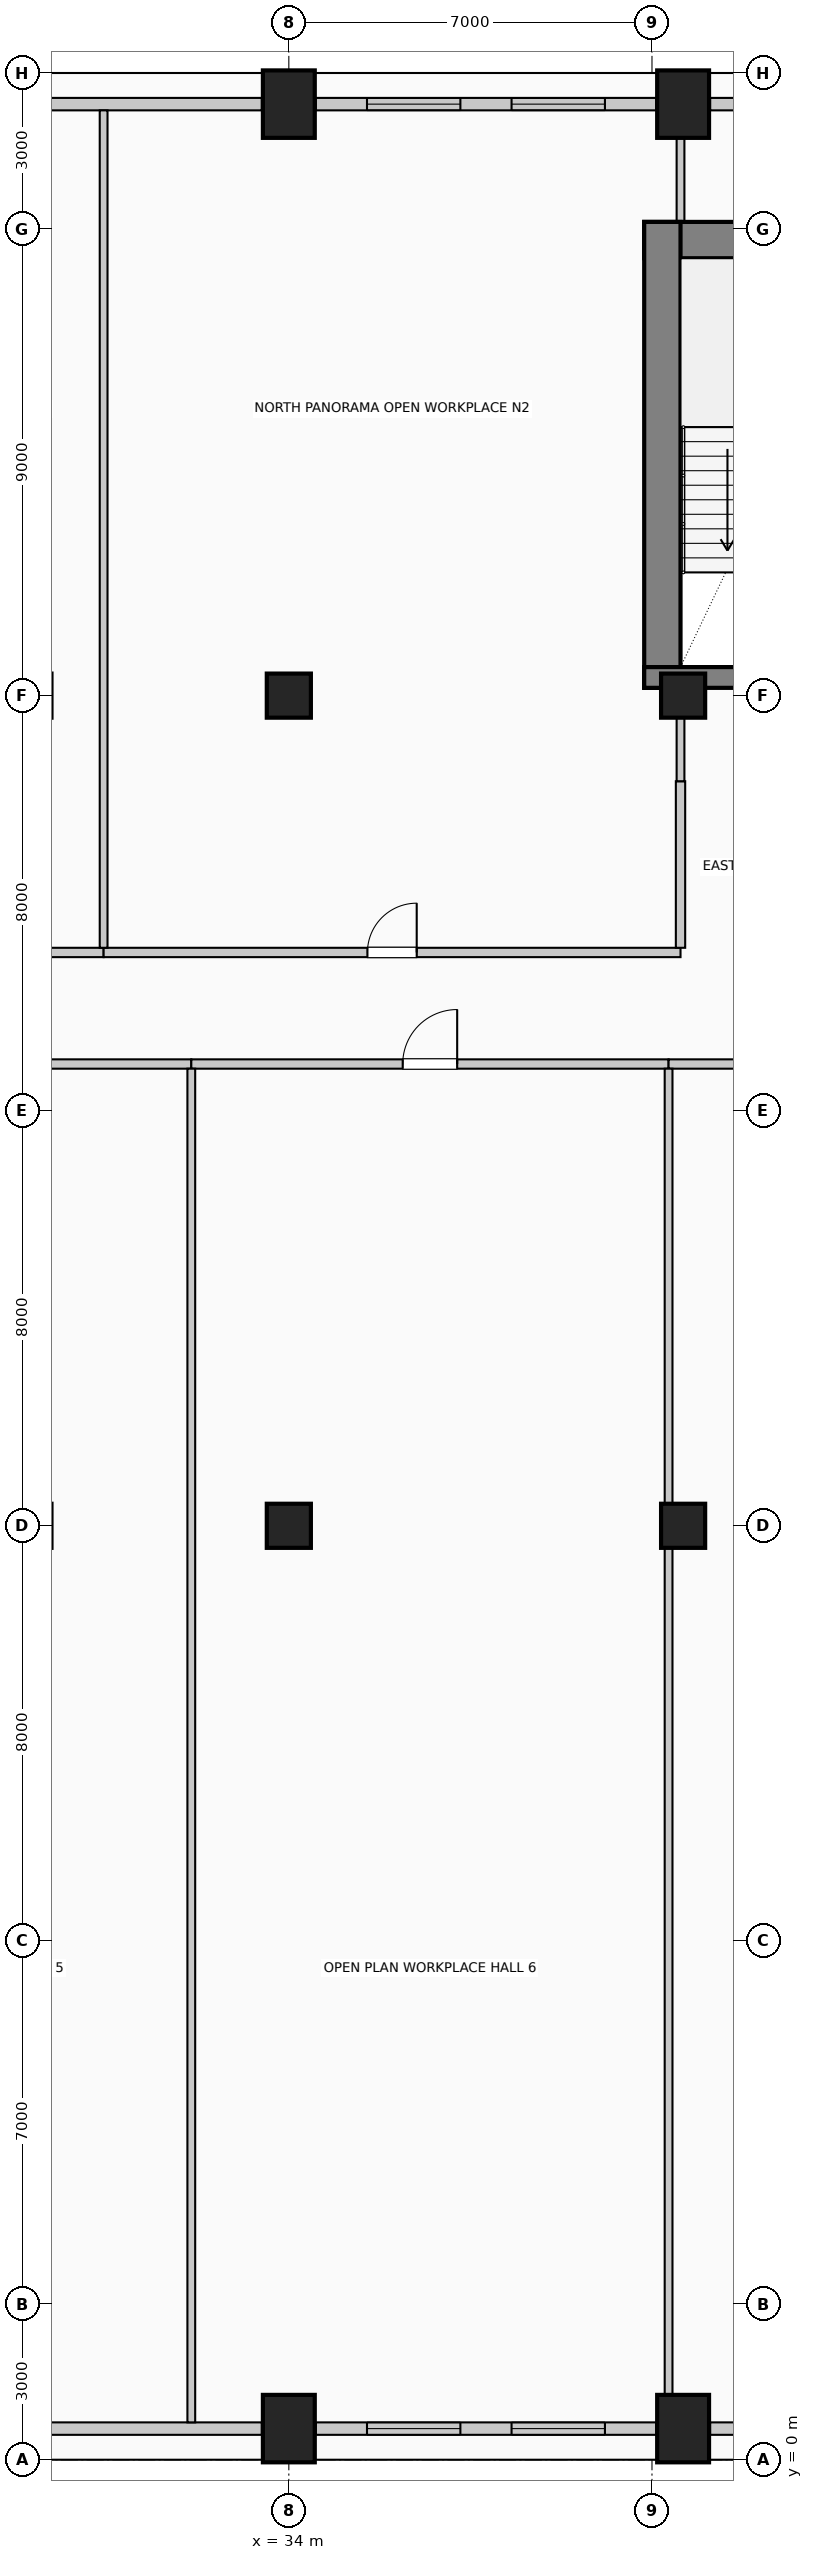
"""IFC4 building model, lengths in metres.
Left out: names, types, materials, properties, quantities, classifications, styles, units other than length and angle.
Written with IfcOpenShell. Run it as: python <this file> out.ifc"""

import sys

from ifc_helpers import new_model, si_unit, direction, frame, frame_2d, origin, origin_2d, place, context, subcontext, project, spatial, rectangle, circle, extrude, element, fill, save


model = new_model("IFC4")
c1 = context("Model", 3, precision=1e-05, world=origin(), true_north=direction((0.0, 1.0)))
c2 = subcontext(c1, "Body", "Model", "MODEL_VIEW")
j1 = project(units=[si_unit("LENGTHUNIT", "METRE"), si_unit("PLANEANGLEUNIT", "RADIAN")], contexts=[c1])
p1 = place(None, origin())
s1 = spatial("IfcSite", under=j1, at=p1, CompositionType="ELEMENT")
p2 = place(p1, origin())
s2 = spatial("IfcBuilding", under=s1, at=p2, CompositionType="ELEMENT")
p3 = place(p2, frame((0.0, 0.0, 248.6)))
s3 = spatial("IfcBuildingStorey", under=s2, at=p3, CompositionType="ELEMENT", Elevation=248.6)
p4 = place(p3, frame((40.85, 42.78, 0.0), z_axis=(0.0, 0.0, 1.0), x_axis=(1.0, 0.0, 0.0)))
e1 = element("IfcWall", 1, at=p4, inside=s3, PredefinedType="SHEAR", context=c2, shape_type="SweptSolid", body=[
    extrude(rectangle(XDim=14.3, YDim=0.7, at=frame_2d((7.15, 0.0))), origin(), (0.0, 0.0, 1.0), 4.0),
])
p5 = place(p3, frame((41.2, 34.15, 0.0), z_axis=(0.0, 0.0, 1.0), x_axis=(0.0, 1.0, 0.0)))
e2 = element("IfcWall", 2, at=p5, inside=s3, PredefinedType="SHEAR", context=c2, shape_type="SweptSolid", body=[
    extrude(rectangle(XDim=8.98, YDim=0.7, at=frame_2d((4.49, 0.0))), origin(), (0.0, 0.0, 1.0), 4.0),
])
p6 = place(p3, frame((40.85, 34.35, 0.0), z_axis=(0.0, 0.0, 1.0), x_axis=(1.0, 0.0, 0.0)))
e3 = element("IfcWall", 3, at=p6, inside=s3, PredefinedType="SHEAR", context=c2, shape_type="SweptSolid", body=[
    extrude(rectangle(XDim=4.86, YDim=0.4, at=frame_2d((2.43, 0.0))), origin(), (0.0, 0.0, 1.0), 4.0),
])
p7 = place(p6, frame((2.4, 0.0, 0.0)))
e4 = element("IfcOpeningElement", 4, at=p7, cuts=e3, PredefinedType="OPENING", context=c2, shape_type="SweptSolid", body=[
    extrude(rectangle(XDim=1.15, YDim=2.2, at=frame_2d((0.575, 1.1))), frame((0.0, 0.21, 0.0), z_axis=(0.0, -1.0, 0.0), x_axis=(1.0, 0.0, 0.0)), (0.0, 0.0, 1.0), 0.42),
])
for number, where, z_axis, x_axis in (
    (5, (34.0, 0.6, 0.0), (0.0, 0.0, 1.0), (1.0, 0.0, 0.0)),
    (6, (34.0, 45.4, 0.0), (0.0, 0.0, 1.0), (1.0, 0.0, 0.0)),
    (7, (41.6, 0.6, 0.0), (0.0, 0.0, 1.0), (1.0, 0.0, 0.0)),
    (8, (41.6, 45.4, 0.0), (0.0, 0.0, 1.0), (1.0, 0.0, 0.0)),
):
    element("IfcColumn", number, at=place(p3, frame(where, z_axis=z_axis, x_axis=x_axis)), inside=s3, PredefinedType="COLUMN", context=c2, shape_type="SweptSolid", body=[
        extrude(rectangle(XDim=1.0, YDim=1.3, at=origin_2d()), origin(), (0.0, 0.0, 1.0), 4.0),
    ])
for number, where, z_axis, x_axis in (
    (9, (41.6, 18.0, 0.0), (0.0, 0.0, 1.0), (1.0, 0.0, 0.0)),
    (10, (41.6, 34.0, 0.0), (0.0, 0.0, 1.0), (1.0, 0.0, 0.0)),
    (11, (34.0, 18.0, 0.0), (0.0, 0.0, 1.0), (1.0, 0.0, 0.0)),
    (12, (34.0, 34.0, 0.0), (0.0, 0.0, 1.0), (1.0, 0.0, 0.0)),
):
    element("IfcColumn", number, at=place(p3, frame(where, z_axis=z_axis, x_axis=x_axis)), inside=s3, PredefinedType="COLUMN", context=c2, shape_type="SweptSolid", body=[
        extrude(circle(Radius=0.425, at=origin_2d()), origin(), (0.0, 0.0, 1.0), 4.0),
    ])
p8 = place(p3, frame((33.48, 0.6, 0.0), z_axis=(0.0, 0.0, 1.0), x_axis=(-1.0, 0.0, 0.0)))
e13 = element("IfcWall", 13, at=p8, inside=s3, PredefinedType="SOLIDWALL", context=c2, shape_type="SweptSolid", body=[
    extrude(rectangle(XDim=4.085, YDim=0.24, at=frame_2d((2.042, 0.0))), origin(), (0.0, 0.0, 1.0), 3.0),
])
p9 = place(p3, frame((41.08, 0.6, 0.0), z_axis=(0.0, 0.0, 1.0), x_axis=(-1.0, 0.0, 0.0)))
e14 = element("IfcWall", 14, at=p9, inside=s3, PredefinedType="SOLIDWALL", context=c2, shape_type="SweptSolid", body=[
    extrude(rectangle(XDim=6.56, YDim=0.24, at=frame_2d((3.28, 0.0))), origin(), (0.0, 0.0, 1.0), 3.0),
])
p10 = place(p9, frame((0.987, 0.0, 0.42)))
e15 = element("IfcOpeningElement", 15, at=p10, cuts=e14, PredefinedType="OPENING", context=c2, shape_type="SweptSolid", body=[
    extrude(rectangle(XDim=1.8, YDim=2.2, at=frame_2d((0.9, 1.1))), frame((0.0, 0.13, 0.0), z_axis=(0.0, -1.0, 0.0), x_axis=(1.0, 0.0, 0.0)), (0.0, 0.0, 1.0), 0.26),
])
p11 = place(p9, frame((3.773, 0.0, 0.42)))
e16 = element("IfcOpeningElement", 16, at=p11, cuts=e14, PredefinedType="OPENING", context=c2, shape_type="SweptSolid", body=[
    extrude(rectangle(XDim=1.8, YDim=2.2, at=frame_2d((0.9, 1.1))), frame((0.0, 0.13, 0.0), z_axis=(0.0, -1.0, 0.0), x_axis=(1.0, 0.0, 0.0)), (0.0, 0.0, 1.0), 0.26),
])
p12 = place(p3, frame((43.605, 0.6, 0.0), z_axis=(0.0, 0.0, 1.0), x_axis=(-1.0, 0.0, 0.0)))
e17 = element("IfcWall", 17, at=p12, inside=s3, PredefinedType="SOLIDWALL", context=c2, shape_type="SweptSolid", body=[
    extrude(rectangle(XDim=1.485, YDim=0.24, at=frame_2d((0.742, 0.0))), origin(), (0.0, 0.0, 1.0), 3.0),
])
p13 = place(p3, frame((29.395, 45.4, 0.0), z_axis=(0.0, 0.0, 1.0), x_axis=(1.0, 0.0, 0.0)))
e18 = element("IfcWall", 18, at=p13, inside=s3, PredefinedType="SOLIDWALL", context=c2, shape_type="SweptSolid", body=[
    extrude(rectangle(XDim=4.085, YDim=0.24, at=frame_2d((2.042, 0.0))), origin(), (0.0, 0.0, 1.0), 3.0),
])
p14 = place(p3, frame((34.52, 45.4, 0.0), z_axis=(0.0, 0.0, 1.0), x_axis=(1.0, 0.0, 0.0)))
e19 = element("IfcWall", 19, at=p14, inside=s3, PredefinedType="SOLIDWALL", context=c2, shape_type="SweptSolid", body=[
    extrude(rectangle(XDim=6.56, YDim=0.24, at=frame_2d((3.28, 0.0))), origin(), (0.0, 0.0, 1.0), 3.0),
])
p15 = place(p14, frame((0.987, 0.0, 0.42)))
e20 = element("IfcOpeningElement", 20, at=p15, cuts=e19, PredefinedType="OPENING", context=c2, shape_type="SweptSolid", body=[
    extrude(rectangle(XDim=1.8, YDim=2.2, at=frame_2d((0.9, 1.1))), frame((0.0, 0.13, 0.0), z_axis=(0.0, -1.0, 0.0), x_axis=(1.0, 0.0, 0.0)), (0.0, 0.0, 1.0), 0.26),
])
p16 = place(p14, frame((3.773, 0.0, 0.42)))
e21 = element("IfcOpeningElement", 21, at=p16, cuts=e19, PredefinedType="OPENING", context=c2, shape_type="SweptSolid", body=[
    extrude(rectangle(XDim=1.8, YDim=2.2, at=frame_2d((0.9, 1.1))), frame((0.0, 0.13, 0.0), z_axis=(0.0, -1.0, 0.0), x_axis=(1.0, 0.0, 0.0)), (0.0, 0.0, 1.0), 0.26),
])
p17 = place(p3, frame((42.12, 45.4, 0.0), z_axis=(0.0, 0.0, 1.0), x_axis=(1.0, 0.0, 0.0)))
e22 = element("IfcWall", 22, at=p17, inside=s3, PredefinedType="SOLIDWALL", context=c2, shape_type="SweptSolid", body=[
    extrude(rectangle(XDim=1.485, YDim=0.24, at=frame_2d((0.742, 0.0))), origin(), (0.0, 0.0, 1.0), 3.0),
])
p18 = place(p3, frame((23.1, 26.9, 0.0), z_axis=(0.0, 0.0, 1.0), x_axis=(1.0, 0.0, 0.0)))
e23 = element("IfcWall", 23, at=p18, inside=s3, PredefinedType="PARTITIONING", context=c2, shape_type="SweptSolid", body=[
    extrude(rectangle(XDim=9.02, YDim=0.18, at=frame_2d((4.51, 0.0))), origin(), (0.0, 0.0, 1.0), 3.75),
])
p19 = place(p18, frame((4.035, 0.0, 0.0)))
e24 = element("IfcOpeningElement", 24, at=p19, cuts=e23, PredefinedType="OPENING", context=c2, shape_type="SweptSolid", body=[
    extrude(rectangle(XDim=0.95, YDim=2.15, at=frame_2d((0.475, 1.075))), frame((0.0, 0.1, 0.0), z_axis=(0.0, -1.0, 0.0), x_axis=(1.0, 0.0, 0.0)), (0.0, 0.0, 1.0), 0.2),
])
p20 = place(p3, frame((32.12, 26.9, 0.0), z_axis=(0.0, 0.0, 1.0), x_axis=(1.0, 0.0, 0.0)))
e25 = element("IfcWall", 25, at=p20, inside=s3, PredefinedType="PARTITIONING", context=c2, shape_type="SweptSolid", body=[
    extrude(rectangle(XDim=9.2, YDim=0.18, at=frame_2d((4.6, 0.0))), origin(), (0.0, 0.0, 1.0), 3.75),
])
p21 = place(p20, frame((4.075, 0.0, 0.0)))
e26 = element("IfcOpeningElement", 26, at=p21, cuts=e25, PredefinedType="OPENING", context=c2, shape_type="SweptSolid", body=[
    extrude(rectangle(XDim=1.05, YDim=2.15, at=frame_2d((0.525, 1.075))), frame((0.0, 0.1, 0.0), z_axis=(0.0, -1.0, 0.0), x_axis=(1.0, 0.0, 0.0)), (0.0, 0.0, 1.0), 0.2),
])
p22 = place(p3, frame((41.32, 26.9, 0.0), z_axis=(0.0, 0.0, 1.0), x_axis=(1.0, 0.0, 0.0)))
e27 = element("IfcWall", 27, at=p22, inside=s3, PredefinedType="PARTITIONING", context=c2, shape_type="SweptSolid", body=[
    extrude(rectangle(XDim=8.18, YDim=0.18, at=frame_2d((4.09, 0.0))), origin(), (0.0, 0.0, 1.0), 3.75),
])
p23 = place(p22, frame((3.615, 0.0, 0.0)))
e28 = element("IfcOpeningElement", 28, at=p23, cuts=e27, PredefinedType="OPENING", context=c2, shape_type="SweptSolid", body=[
    extrude(rectangle(XDim=0.95, YDim=2.15, at=frame_2d((0.475, 1.075))), frame((0.0, 0.1, 0.0), z_axis=(0.0, -1.0, 0.0), x_axis=(1.0, 0.0, 0.0)), (0.0, 0.0, 1.0), 0.2),
])
p24 = place(p3, frame((23.1, 29.05, 0.0), z_axis=(0.0, 0.0, 1.0), x_axis=(1.0, 0.0, 0.0)))
e29 = element("IfcWall", 29, at=p24, inside=s3, PredefinedType="PARTITIONING", context=c2, shape_type="SweptSolid", body=[
    extrude(rectangle(XDim=7.33, YDim=0.18, at=frame_2d((3.665, 0.0))), origin(), (0.0, 0.0, 1.0), 3.75),
])
p25 = place(p24, frame((3.14, 0.0, 0.0)))
e30 = element("IfcOpeningElement", 30, at=p25, cuts=e29, PredefinedType="OPENING", context=c2, shape_type="SweptSolid", body=[
    extrude(rectangle(XDim=1.05, YDim=2.15, at=frame_2d((0.525, 1.075))), frame((0.0, 0.1, 0.0), z_axis=(0.0, -1.0, 0.0), x_axis=(1.0, 0.0, 0.0)), (0.0, 0.0, 1.0), 0.2),
])
p26 = place(p3, frame((30.43, 29.05, 0.0), z_axis=(0.0, 0.0, 1.0), x_axis=(1.0, 0.0, 0.0)))
e31 = element("IfcWall", 31, at=p26, inside=s3, PredefinedType="PARTITIONING", context=c2, shape_type="SweptSolid", body=[
    extrude(rectangle(XDim=11.12, YDim=0.18, at=frame_2d((5.56, 0.0))), origin(), (0.0, 0.0, 1.0), 3.75),
])
p27 = place(p26, frame((5.085, 0.0, 0.0)))
e32 = element("IfcOpeningElement", 32, at=p27, cuts=e31, PredefinedType="OPENING", context=c2, shape_type="SweptSolid", body=[
    extrude(rectangle(XDim=0.95, YDim=2.15, at=frame_2d((0.475, 1.075))), frame((0.0, 0.1, 0.0), z_axis=(0.0, -1.0, 0.0), x_axis=(1.0, 0.0, 0.0)), (0.0, 0.0, 1.0), 0.2),
])
p28 = place(p3, frame((30.43, 29.14, 0.0), z_axis=(0.0, 0.0, 1.0), x_axis=(0.0, 1.0, 0.0)))
e33 = element("IfcWall", 33, at=p28, inside=s3, PredefinedType="PARTITIONING", context=c2, shape_type="SweptSolid", body=[
    extrude(rectangle(XDim=16.14, YDim=0.15, at=frame_2d((8.07, 0.0))), origin(), (0.0, 0.0, 1.0), 3.75),
])
p29 = place(p3, frame((32.12, 0.72, 0.0), z_axis=(0.0, 0.0, 1.0), x_axis=(0.0, 1.0, 0.0)))
e34 = element("IfcWall", 34, at=p29, inside=s3, PredefinedType="PARTITIONING", context=c2, shape_type="SweptSolid", body=[
    extrude(rectangle(XDim=26.09, YDim=0.15, at=frame_2d((13.045, 0.0))), origin(), (0.0, 0.0, 1.0), 3.75),
])
p30 = place(p3, frame((41.32, 1.25, 0.0), z_axis=(0.0, 0.0, 1.0), x_axis=(0.0, 1.0, 0.0)))
e35 = element("IfcWall", 35, at=p30, inside=s3, PredefinedType="PARTITIONING", context=c2, shape_type="SweptSolid", body=[
    extrude(rectangle(XDim=16.325, YDim=0.15, at=frame_2d((8.163, 0.0))), origin(), (0.0, 0.0, 1.0), 3.195),
])
p31 = place(p3, frame((41.32, 18.425, 0.0), z_axis=(0.0, 0.0, 1.0), x_axis=(0.0, 1.0, 0.0)))
e36 = element("IfcWall", 36, at=p31, inside=s3, PredefinedType="PARTITIONING", context=c2, shape_type="SweptSolid", body=[
    extrude(rectangle(XDim=8.385, YDim=0.15, at=frame_2d((4.192, 0.0))), origin(), (0.0, 0.0, 1.0), 3.195),
])
p32 = place(p3, frame((41.55, 29.14, 0.0), z_axis=(0.0, 0.0, 1.0), x_axis=(0.0, 1.0, 0.0)))
e37 = element("IfcWall", 37, at=p32, inside=s3, PredefinedType="PARTITIONING", context=c2, shape_type="SweptSolid", body=[
    extrude(rectangle(XDim=3.21, YDim=0.18, at=frame_2d((1.605, 0.0))), origin(), (0.0, 0.0, 1.0), 3.195),
])
p33 = place(p3, frame((41.55, 32.35, 0.0), z_axis=(0.0, 0.0, 1.0), x_axis=(0.0, 1.0, 0.0)))
e38 = element("IfcWall", 38, at=p33, inside=s3, PredefinedType="PARTITIONING", context=c2, shape_type="SweptSolid", body=[
    extrude(rectangle(XDim=1.225, YDim=0.15, at=frame_2d((0.612, 0.0))), origin(), (0.0, 0.0, 1.0), 3.195),
])
p34 = place(p3, frame((41.55, 43.13, 0.0), z_axis=(0.0, 0.0, 1.0), x_axis=(0.0, 1.0, 0.0)))
e39 = element("IfcWall", 39, at=p34, inside=s3, PredefinedType="PARTITIONING", context=c2, shape_type="SweptSolid", body=[
    extrude(rectangle(XDim=1.62, YDim=0.15, at=frame_2d((0.81, 0.0))), origin(), (0.0, 0.0, 1.0), 3.75),
])
p35 = place(p10, origin())
e40 = element("IfcWindow", 40, at=p35, inside=s3, PartitioningType="SINGLE_PANEL", PredefinedType="WINDOW", context=c2, shape_type="SweptSolid", body=[
    extrude(rectangle(XDim=1.8, YDim=2.2, at=frame_2d((0.9, 1.1))), frame((0.0, 0.03, 0.0), z_axis=(0.0, -1.0, 0.0), x_axis=(1.0, 0.0, 0.0)), (0.0, 0.0, 1.0), 0.06),
])
fill(e15, e40)
p36 = place(p11, origin())
e41 = element("IfcWindow", 41, at=p36, inside=s3, PartitioningType="SINGLE_PANEL", PredefinedType="WINDOW", context=c2, shape_type="SweptSolid", body=[
    extrude(rectangle(XDim=1.8, YDim=2.2, at=frame_2d((0.9, 1.1))), frame((0.0, 0.03, 0.0), z_axis=(0.0, -1.0, 0.0), x_axis=(1.0, 0.0, 0.0)), (0.0, 0.0, 1.0), 0.06),
])
fill(e16, e41)
p37 = place(p15, origin())
e42 = element("IfcWindow", 42, at=p37, inside=s3, PartitioningType="SINGLE_PANEL", PredefinedType="WINDOW", context=c2, shape_type="SweptSolid", body=[
    extrude(rectangle(XDim=1.8, YDim=2.2, at=frame_2d((0.9, 1.1))), frame((0.0, 0.03, 0.0), z_axis=(0.0, -1.0, 0.0), x_axis=(1.0, 0.0, 0.0)), (0.0, 0.0, 1.0), 0.06),
])
fill(e20, e42)
p38 = place(p16, origin())
e43 = element("IfcWindow", 43, at=p38, inside=s3, PartitioningType="SINGLE_PANEL", PredefinedType="WINDOW", context=c2, shape_type="SweptSolid", body=[
    extrude(rectangle(XDim=1.8, YDim=2.2, at=frame_2d((0.9, 1.1))), frame((0.0, 0.03, 0.0), z_axis=(0.0, -1.0, 0.0), x_axis=(1.0, 0.0, 0.0)), (0.0, 0.0, 1.0), 0.06),
])
fill(e21, e43)
p39 = place(p21, origin())
e44 = element("IfcDoor", 44, at=p39, inside=s3, OperationType="SINGLE_SWING_RIGHT", PredefinedType="DOOR", context=c2, shape_type="SweptSolid", body=[
    extrude(rectangle(XDim=1.05, YDim=2.15, at=frame_2d((0.525, 1.075))), frame((0.0, 0.025, 0.0), z_axis=(0.0, -1.0, 0.0), x_axis=(1.0, 0.0, 0.0)), (0.0, 0.0, 1.0), 0.05),
])
fill(e26, e44)
p40 = place(p27, origin())
e45 = element("IfcDoor", 45, at=p40, inside=s3, OperationType="SINGLE_SWING_RIGHT", PredefinedType="DOOR", context=c2, shape_type="SweptSolid", body=[
    extrude(rectangle(XDim=0.95, YDim=2.15, at=frame_2d((0.475, 1.075))), frame((0.0, 0.025, 0.0), z_axis=(0.0, -1.0, 0.0), x_axis=(1.0, 0.0, 0.0)), (0.0, 0.0, 1.0), 0.05),
])
fill(e32, e45)
save(model, sys.argv[1])
